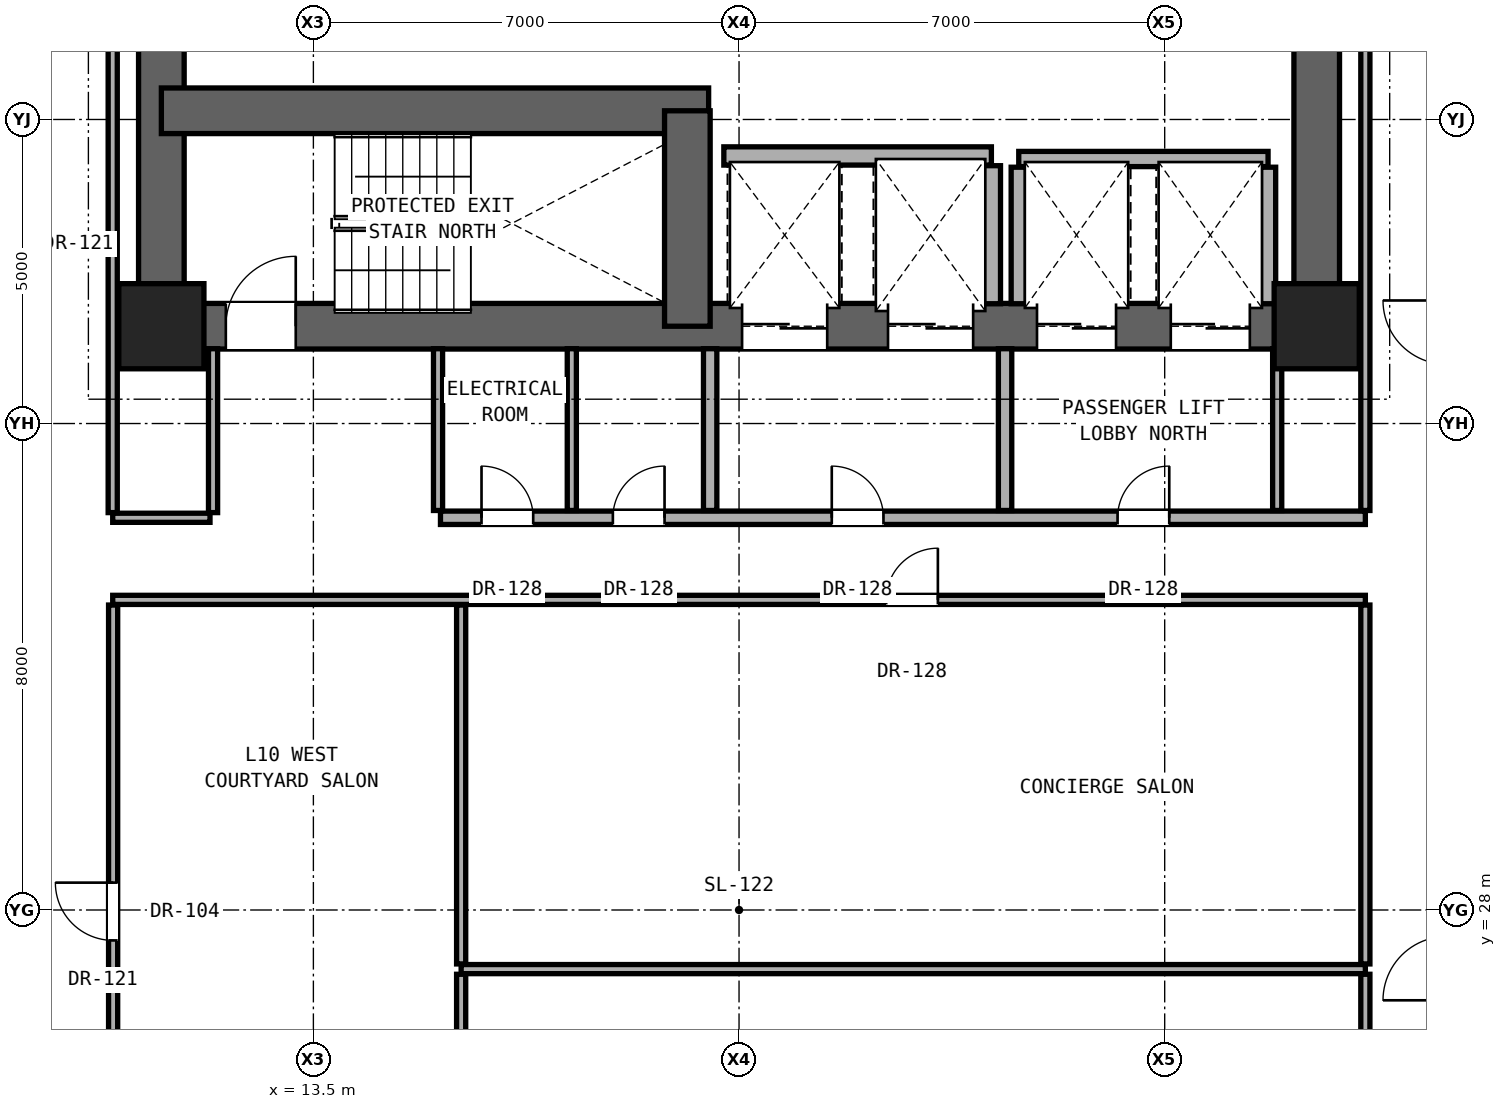
"""IFC4 building model, lengths in metres.
Left out: names, types, materials, properties, quantities, classifications, styles, units other than length and angle.
Written with IfcOpenShell. Run it as: python <this file> out.ifc"""

import sys

from ifc_helpers import new_model, si_unit, direction, frame, frame_2d, origin, origin_2d, place, context, subcontext, project, spatial, rectangle, extrude, element, fill, save


model = new_model("IFC4")
c1 = context("Model", 3, precision=1e-05, world=origin(), true_north=direction((0.0, 1.0)))
c2 = subcontext(c1, "Body", "Model", "MODEL_VIEW")
j1 = project(units=[si_unit("LENGTHUNIT", "METRE"), si_unit("PLANEANGLEUNIT", "RADIAN")], contexts=[c1])
p1 = place(None, origin())
s1 = spatial("IfcSite", under=j1, at=p1, CompositionType="ELEMENT")
p2 = place(p1, origin())
s2 = spatial("IfcBuilding", under=s1, at=p2, CompositionType="ELEMENT")
p3 = place(p2, frame((0.0, 0.0, 38.9)))
s3 = spatial("IfcBuildingStorey", under=s2, at=p3, CompositionType="ELEMENT", Elevation=38.9)
for number, where, z_axis, x_axis in (
    (1, (11.0, 37.6, 0.0), (0.0, 0.0, 1.0), (1.0, 0.0, 0.0)),
    (2, (30.0, 37.6, 0.0), (0.0, 0.0, 1.0), (1.0, 0.0, 0.0)),
):
    element("IfcColumn", number, at=place(p3, frame(where, z_axis=z_axis, x_axis=x_axis)), inside=s3, PredefinedType="COLUMN", context=c2, shape_type="SweptSolid", body=[
        extrude(rectangle(XDim=1.4, YDim=1.4, at=origin_2d()), origin(), (0.0, 0.0, 1.0), 3.3),
    ])
for number, where, z_axis, x_axis in (
    (3, (11.0, 37.6, 0.0), (0.0, 0.0, 1.0), (0.0, 1.0, 0.0)),
    (4, (30.0, 37.6, 0.0), (0.0, 0.0, 1.0), (0.0, 1.0, 0.0)),
):
    element("IfcWall", number, at=place(p3, frame(where, z_axis=z_axis, x_axis=x_axis)), inside=s3, PredefinedType="SHEAR", context=c2, shape_type="SweptSolid", body=[
        extrude(rectangle(XDim=6.0, YDim=0.75, at=frame_2d((3.0, 0.0))), origin(), (0.0, 0.0, 1.0), 3.06),
    ])
p4 = place(p3, frame((11.0, 37.6, 0.0), z_axis=(0.0, 0.0, 1.0), x_axis=(1.0, 0.0, 0.0)))
e5 = element("IfcWall", 5, at=p4, inside=s3, PredefinedType="SHEAR", context=c2, shape_type="SweptSolid", body=[
    extrude(rectangle(XDim=19.0, YDim=0.75, at=frame_2d((9.5, 0.0))), origin(), (0.0, 0.0, 1.0), 3.06),
])
p5 = place(p4, frame((1.06, 0.0, 0.0)))
e6 = element("IfcOpeningElement", 6, at=p5, cuts=e5, PredefinedType="OPENING", context=c2, shape_type="SweptSolid", body=[
    extrude(rectangle(XDim=1.15, YDim=2.2, at=frame_2d((0.575, 1.1))), frame((0.0, 0.385, 0.0), z_axis=(0.0, -1.0, 0.0), x_axis=(1.0, 0.0, 0.0)), (0.0, 0.0, 1.0), 0.77),
])
p6 = place(p4, frame((9.55, 0.0, 0.0)))
e7 = element("IfcOpeningElement", 7, at=p6, cuts=e5, PredefinedType="OPENING", context=c2, shape_type="SweptSolid", body=[
    extrude(rectangle(XDim=1.4, YDim=2.35, at=frame_2d((0.7, 1.175))), frame((0.0, 0.385, 0.0), z_axis=(0.0, -1.0, 0.0), x_axis=(1.0, 0.0, 0.0)), (0.0, 0.0, 1.0), 0.77),
])
p7 = place(p4, frame((11.95, 0.0, 0.0)))
e8 = element("IfcOpeningElement", 8, at=p7, cuts=e5, PredefinedType="OPENING", context=c2, shape_type="SweptSolid", body=[
    extrude(rectangle(XDim=1.4, YDim=2.35, at=frame_2d((0.7, 1.175))), frame((0.0, 0.385, 0.0), z_axis=(0.0, -1.0, 0.0), x_axis=(1.0, 0.0, 0.0)), (0.0, 0.0, 1.0), 0.77),
])
p8 = place(p4, frame((14.4, 0.0, 0.0)))
e9 = element("IfcOpeningElement", 9, at=p8, cuts=e5, PredefinedType="OPENING", context=c2, shape_type="SweptSolid", body=[
    extrude(rectangle(XDim=1.3, YDim=2.3, at=frame_2d((0.65, 1.15))), frame((0.0, 0.385, 0.0), z_axis=(0.0, -1.0, 0.0), x_axis=(1.0, 0.0, 0.0)), (0.0, 0.0, 1.0), 0.77),
])
p9 = place(p4, frame((16.6, 0.0, 0.0)))
e10 = element("IfcOpeningElement", 10, at=p9, cuts=e5, PredefinedType="OPENING", context=c2, shape_type="SweptSolid", body=[
    extrude(rectangle(XDim=1.3, YDim=2.3, at=frame_2d((0.65, 1.15))), frame((0.0, 0.385, 0.0), z_axis=(0.0, -1.0, 0.0), x_axis=(1.0, 0.0, 0.0)), (0.0, 0.0, 1.0), 0.77),
])
p10 = place(p3, frame((11.0, 41.143, 0.0), z_axis=(0.0, 0.0, 1.0), x_axis=(1.0, 0.0, 0.0)))
e11 = element("IfcWall", 11, at=p10, inside=s3, PredefinedType="SHEAR", context=c2, shape_type="SweptSolid", body=[
    extrude(rectangle(XDim=9.0, YDim=0.75, at=frame_2d((4.5, 0.0))), origin(), (0.0, 0.0, 1.0), 3.06),
])
p11 = place(p3, frame((19.65, 37.6, 0.0), z_axis=(0.0, 0.0, 1.0), x_axis=(0.0, 1.0, 0.0)))
e12 = element("IfcWall", 12, at=p11, inside=s3, PredefinedType="SHEAR", context=c2, shape_type="SweptSolid", body=[
    extrude(rectangle(XDim=3.543, YDim=0.75, at=frame_2d((1.771, 0.0))), origin(), (0.0, 0.0, 1.0), 3.06),
])
p12 = place(p3, frame((15.93, 27.028, 0.0), z_axis=(0.0, 0.0, 1.0), x_axis=(1.0, 0.0, 0.0)))
e13 = element("IfcWall", 13, at=p12, inside=s3, PredefinedType="PARTITIONING", context=c2, shape_type="SweptSolid", body=[
    extrude(rectangle(XDim=14.87, YDim=0.15, at=frame_2d((7.435, 0.0))), origin(), (0.0, 0.0, 1.0), 2.104),
])
p13 = place(p3, frame((10.2, 33.1, 0.0), z_axis=(0.0, 0.0, 1.0), x_axis=(1.0, 0.0, 0.0)))
e14 = element("IfcWall", 14, at=p13, inside=s3, PredefinedType="PARTITIONING", context=c2, shape_type="SweptSolid", body=[
    extrude(rectangle(XDim=20.6, YDim=0.15, at=frame_2d((10.3, 0.0))), origin(), (0.0, 0.0, 1.0), 2.104),
])
p14 = place(p13, frame((12.72, 0.0, 0.0)))
e15 = element("IfcOpeningElement", 15, at=p14, cuts=e14, PredefinedType="OPENING", context=c2, shape_type="SweptSolid", body=[
    extrude(rectangle(XDim=0.85, YDim=2.01, at=frame_2d((0.425, 1.005))), frame((0.0, 0.085, 0.0), z_axis=(0.0, -1.0, 0.0), x_axis=(1.0, 0.0, 0.0)), (0.0, 0.0, 1.0), 0.17),
])
p15 = place(p3, frame((10.2, 34.45, 0.0), z_axis=(0.0, 0.0, 1.0), x_axis=(1.0, 0.0, 0.0)))
e16 = element("IfcWall", 16, at=p15, inside=s3, PredefinedType="PARTITIONING", context=c2, shape_type="SweptSolid", body=[
    extrude(rectangle(XDim=1.6, YDim=0.15, at=frame_2d((0.8, 0.0))), origin(), (0.0, 0.0, 1.0), 2.104),
])
p16 = place(p3, frame((15.59, 34.45, 0.0), z_axis=(0.0, 0.0, 1.0), x_axis=(1.0, 0.0, 0.0)))
e17 = element("IfcWall", 17, at=p16, inside=s3, PredefinedType="SOLIDWALL", context=c2, shape_type="SweptSolid", body=[
    extrude(rectangle(XDim=15.21, YDim=0.22, at=frame_2d((7.605, 0.0))), origin(), (0.0, 0.0, 1.0), 2.104),
])
p17 = place(p16, frame((6.435, 0.0, 0.0)))
e18 = element("IfcOpeningElement", 18, at=p17, cuts=e17, PredefinedType="OPENING", context=c2, shape_type="SweptSolid", body=[
    extrude(rectangle(XDim=0.85, YDim=2.01, at=frame_2d((0.425, 1.005))), frame((0.0, 0.12, 0.0), z_axis=(0.0, -1.0, 0.0), x_axis=(1.0, 0.0, 0.0)), (0.0, 0.0, 1.0), 0.24),
])
p18 = place(p16, frame((11.135, 0.0, 0.0)))
e19 = element("IfcOpeningElement", 19, at=p18, cuts=e17, PredefinedType="OPENING", context=c2, shape_type="SweptSolid", body=[
    extrude(rectangle(XDim=0.85, YDim=2.01, at=frame_2d((0.425, 1.005))), frame((0.0, 0.12, 0.0), z_axis=(0.0, -1.0, 0.0), x_axis=(1.0, 0.0, 0.0)), (0.0, 0.0, 1.0), 0.24),
])
p19 = place(p16, frame((0.675, 0.0, 0.0)))
e20 = element("IfcOpeningElement", 20, at=p19, cuts=e17, PredefinedType="OPENING", context=c2, shape_type="SweptSolid", body=[
    extrude(rectangle(XDim=0.85, YDim=2.01, at=frame_2d((0.425, 1.005))), frame((0.0, 0.12, 0.0), z_axis=(0.0, -1.0, 0.0), x_axis=(1.0, 0.0, 0.0)), (0.0, 0.0, 1.0), 0.24),
])
p20 = place(p16, frame((2.835, 0.0, 0.0)))
e21 = element("IfcOpeningElement", 21, at=p20, cuts=e17, PredefinedType="OPENING", context=c2, shape_type="SweptSolid", body=[
    extrude(rectangle(XDim=0.85, YDim=2.01, at=frame_2d((0.425, 1.005))), frame((0.0, 0.12, 0.0), z_axis=(0.0, -1.0, 0.0), x_axis=(1.0, 0.0, 0.0)), (0.0, 0.0, 1.0), 0.24),
])
p21 = place(p3, frame((25.1, 40.35, 0.0), z_axis=(0.0, 0.0, 1.0), x_axis=(1.0, 0.0, 0.0)))
e22 = element("IfcWall", 22, at=p21, inside=s3, PredefinedType="SOLIDWALL", context=c2, shape_type="SweptSolid", body=[
    extrude(rectangle(XDim=4.1, YDim=0.25, at=frame_2d((2.05, 0.0))), origin(), (0.0, 0.0, 1.0), 3.06),
])
p22 = place(p3, frame((20.25, 40.4, 0.0), z_axis=(0.0, 0.0, 1.0), x_axis=(1.0, 0.0, 0.0)))
e23 = element("IfcWall", 23, at=p22, inside=s3, PredefinedType="SOLIDWALL", context=c2, shape_type="SweptSolid", body=[
    extrude(rectangle(XDim=4.4, YDim=0.3, at=frame_2d((2.2, 0.0))), origin(), (0.0, 0.0, 1.0), 3.06),
])
p23 = place(p3, frame((10.207, 22.935, 0.0), z_axis=(0.0, 0.0, 1.0), x_axis=(0.0, 1.0, 0.0)))
e24 = element("IfcWall", 24, at=p23, inside=s3, PredefinedType="PARTITIONING", context=c2, shape_type="SweptSolid", body=[
    extrude(rectangle(XDim=10.08, YDim=0.15, at=frame_2d((5.04, 0.0))), origin(), (0.0, 0.0, 1.0), 2.279),
])
p24 = place(p23, frame((4.565, 0.0, 0.0)))
e25 = element("IfcOpeningElement", 25, at=p24, cuts=e24, PredefinedType="OPENING", context=c2, shape_type="SweptSolid", body=[
    extrude(rectangle(XDim=0.95, YDim=2.15, at=frame_2d((0.475, 1.075))), frame((0.0, 0.085, 0.0), z_axis=(0.0, -1.0, 0.0), x_axis=(1.0, 0.0, 0.0)), (0.0, 0.0, 1.0), 0.17),
])
p25 = place(p3, frame((10.2, 34.535, 0.0), z_axis=(0.0, 0.0, 1.0), x_axis=(0.0, 1.0, 0.0)))
e26 = element("IfcWall", 26, at=p25, inside=s3, PredefinedType="PARTITIONING", context=c2, shape_type="SweptSolid", body=[
    extrude(rectangle(XDim=9.13, YDim=0.15, at=frame_2d((4.565, 0.0))), origin(), (0.0, 0.0, 1.0), 2.436),
])
p26 = place(p3, frame((11.85, 34.535, 0.0), z_axis=(0.0, 0.0, 1.0), x_axis=(0.0, 1.0, 0.0)))
e27 = element("IfcWall", 27, at=p26, inside=s3, PredefinedType="PARTITIONING", context=c2, shape_type="SweptSolid", body=[
    extrude(rectangle(XDim=2.695, YDim=0.15, at=frame_2d((1.348, 0.0))), origin(), (0.0, 0.0, 1.0), 3.06),
])
p27 = place(p3, frame((15.55, 34.57, 0.0), z_axis=(0.0, 0.0, 1.0), x_axis=(0.0, 1.0, 0.0)))
e28 = element("IfcWall", 28, at=p27, inside=s3, PredefinedType="PARTITIONING", context=c2, shape_type="SweptSolid", body=[
    extrude(rectangle(XDim=2.66, YDim=0.15, at=frame_2d((1.33, 0.0))), origin(), (0.0, 0.0, 1.0), 2.589),
])
p28 = place(p3, frame((15.93, 22.935, 0.0), z_axis=(0.0, 0.0, 1.0), x_axis=(0.0, 1.0, 0.0)))
e29 = element("IfcWall", 29, at=p28, inside=s3, PredefinedType="PARTITIONING", context=c2, shape_type="SweptSolid", body=[
    extrude(rectangle(XDim=4.008, YDim=0.15, at=frame_2d((2.004, 0.0))), origin(), (0.0, 0.0, 1.0), 2.104),
])
p29 = place(p3, frame((15.93, 27.113, 0.0), z_axis=(0.0, 0.0, 1.0), x_axis=(0.0, 1.0, 0.0)))
e30 = element("IfcWall", 30, at=p29, inside=s3, PredefinedType="PARTITIONING", context=c2, shape_type="SweptSolid", body=[
    extrude(rectangle(XDim=5.902, YDim=0.15, at=frame_2d((2.951, 0.0))), origin(), (0.0, 0.0, 1.0), 2.104),
])
p30 = place(p3, frame((17.75, 34.57, 0.0), z_axis=(0.0, 0.0, 1.0), x_axis=(0.0, 1.0, 0.0)))
e31 = element("IfcWall", 31, at=p30, inside=s3, PredefinedType="PARTITIONING", context=c2, shape_type="SweptSolid", body=[
    extrude(rectangle(XDim=2.66, YDim=0.15, at=frame_2d((1.33, 0.0))), origin(), (0.0, 0.0, 1.0), 3.06),
])
p31 = place(p3, frame((20.025, 34.57, 0.0), z_axis=(0.0, 0.0, 1.0), x_axis=(0.0, 1.0, 0.0)))
e32 = element("IfcWall", 32, at=p31, inside=s3, PredefinedType="SOLIDWALL", context=c2, shape_type="SweptSolid", body=[
    extrude(rectangle(XDim=2.66, YDim=0.22, at=frame_2d((1.33, 0.0))), origin(), (0.0, 0.0, 1.0), 3.06),
])
p32 = place(p3, frame((24.65, 37.97, 0.0), z_axis=(0.0, 0.0, 1.0), x_axis=(0.0, 1.0, 0.0)))
e33 = element("IfcWall", 33, at=p32, inside=s3, PredefinedType="SOLIDWALL", context=c2, shape_type="SweptSolid", body=[
    extrude(rectangle(XDim=2.27, YDim=0.3, at=frame_2d((1.135, 0.0))), origin(), (0.0, 0.0, 1.0), 3.06),
])
p33 = place(p3, frame((24.875, 34.57, 0.0), z_axis=(0.0, 0.0, 1.0), x_axis=(0.0, 1.0, 0.0)))
e34 = element("IfcWall", 34, at=p33, inside=s3, PredefinedType="SOLIDWALL", context=c2, shape_type="SweptSolid", body=[
    extrude(rectangle(XDim=2.66, YDim=0.22, at=frame_2d((1.33, 0.0))), origin(), (0.0, 0.0, 1.0), 3.06),
])
p34 = place(p3, frame((25.1, 37.97, 0.0), z_axis=(0.0, 0.0, 1.0), x_axis=(0.0, 1.0, 0.0)))
e35 = element("IfcWall", 35, at=p34, inside=s3, PredefinedType="SOLIDWALL", context=c2, shape_type="SweptSolid", body=[
    extrude(rectangle(XDim=2.245, YDim=0.25, at=frame_2d((1.123, 0.0))), origin(), (0.0, 0.0, 1.0), 3.06),
])
p35 = place(p3, frame((29.35, 34.57, 0.0), z_axis=(0.0, 0.0, 1.0), x_axis=(0.0, 1.0, 0.0)))
e36 = element("IfcWall", 36, at=p35, inside=s3, PredefinedType="PARTITIONING", context=c2, shape_type="SweptSolid", body=[
    extrude(rectangle(XDim=2.66, YDim=0.15, at=frame_2d((1.33, 0.0))), origin(), (0.0, 0.0, 1.0), 3.06),
])
p36 = place(p3, frame((29.2, 37.97, 0.0), z_axis=(0.0, 0.0, 1.0), x_axis=(0.0, 1.0, 0.0)))
e37 = element("IfcWall", 37, at=p36, inside=s3, PredefinedType="SOLIDWALL", context=c2, shape_type="SweptSolid", body=[
    extrude(rectangle(XDim=2.245, YDim=0.25, at=frame_2d((1.123, 0.0))), origin(), (0.0, 0.0, 1.0), 3.06),
])
p37 = place(p3, frame((30.8, 19.985, 0.0), z_axis=(0.0, 0.0, 1.0), x_axis=(0.0, 1.0, 0.0)))
e38 = element("IfcWall", 38, at=p37, inside=s3, PredefinedType="PARTITIONING", context=c2, shape_type="SweptSolid", body=[
    extrude(rectangle(XDim=6.958, YDim=0.15, at=frame_2d((3.479, 0.0))), origin(), (0.0, 0.0, 1.0), 2.279),
])
p38 = place(p3, frame((30.8, 27.113, 0.0), z_axis=(0.0, 0.0, 1.0), x_axis=(0.0, 1.0, 0.0)))
e39 = element("IfcWall", 39, at=p38, inside=s3, PredefinedType="PARTITIONING", context=c2, shape_type="SweptSolid", body=[
    extrude(rectangle(XDim=5.902, YDim=0.15, at=frame_2d((2.951, 0.0))), origin(), (0.0, 0.0, 1.0), 2.279),
])
p39 = place(p3, frame((30.8, 34.57, 0.0), z_axis=(0.0, 0.0, 1.0), x_axis=(0.0, 1.0, 0.0)))
e40 = element("IfcWall", 40, at=p39, inside=s3, PredefinedType="PARTITIONING", context=c2, shape_type="SweptSolid", body=[
    extrude(rectangle(XDim=9.095, YDim=0.15, at=frame_2d((4.547, 0.0))), origin(), (0.0, 0.0, 1.0), 2.436),
])
p40 = place(p5, origin())
e41 = element("IfcDoor", 41, at=p40, inside=s3, OperationType="SINGLE_SWING_RIGHT", PredefinedType="DOOR", context=c2, shape_type="SweptSolid", body=[
    extrude(rectangle(XDim=1.15, YDim=2.2, at=frame_2d((0.575, 1.1))), frame((0.0, 0.025, 0.0), z_axis=(0.0, -1.0, 0.0), x_axis=(1.0, 0.0, 0.0)), (0.0, 0.0, 1.0), 0.05),
])
fill(e6, e41)
p41 = place(p17, origin())
e42 = element("IfcDoor", 42, at=p41, inside=s3, OperationType="SINGLE_SWING_LEFT", PredefinedType="DOOR", context=c2, shape_type="SweptSolid", body=[
    extrude(rectangle(XDim=0.85, YDim=2.01, at=frame_2d((0.425, 1.005))), frame((0.0, 0.025, 0.0), z_axis=(0.0, -1.0, 0.0), x_axis=(1.0, 0.0, 0.0)), (0.0, 0.0, 1.0), 0.05),
])
fill(e18, e42)
p42 = place(p18, origin())
e43 = element("IfcDoor", 43, at=p42, inside=s3, OperationType="SINGLE_SWING_RIGHT", PredefinedType="DOOR", context=c2, shape_type="SweptSolid", body=[
    extrude(rectangle(XDim=0.85, YDim=2.01, at=frame_2d((0.425, 1.005))), frame((0.0, 0.025, 0.0), z_axis=(0.0, -1.0, 0.0), x_axis=(1.0, 0.0, 0.0)), (0.0, 0.0, 1.0), 0.05),
])
fill(e19, e43)
p43 = place(p19, origin())
e44 = element("IfcDoor", 44, at=p43, inside=s3, OperationType="SINGLE_SWING_LEFT", PredefinedType="DOOR", context=c2, shape_type="SweptSolid", body=[
    extrude(rectangle(XDim=0.85, YDim=2.01, at=frame_2d((0.425, 1.005))), frame((0.0, 0.025, 0.0), z_axis=(0.0, -1.0, 0.0), x_axis=(1.0, 0.0, 0.0)), (0.0, 0.0, 1.0), 0.05),
])
fill(e20, e44)
p44 = place(p20, origin())
e45 = element("IfcDoor", 45, at=p44, inside=s3, OperationType="SINGLE_SWING_RIGHT", PredefinedType="DOOR", context=c2, shape_type="SweptSolid", body=[
    extrude(rectangle(XDim=0.85, YDim=2.01, at=frame_2d((0.425, 1.005))), frame((0.0, 0.025, 0.0), z_axis=(0.0, -1.0, 0.0), x_axis=(1.0, 0.0, 0.0)), (0.0, 0.0, 1.0), 0.05),
])
fill(e21, e45)
p45 = place(p24, origin())
e46 = element("IfcDoor", 46, at=p45, inside=s3, OperationType="SINGLE_SWING_RIGHT", PredefinedType="DOOR", context=c2, shape_type="SweptSolid", body=[
    extrude(rectangle(XDim=0.95, YDim=2.15, at=frame_2d((0.475, 1.075))), frame((0.0, 0.025, 0.0), z_axis=(0.0, -1.0, 0.0), x_axis=(1.0, 0.0, 0.0)), (0.0, 0.0, 1.0), 0.05),
])
fill(e25, e46)
p46 = place(p14, origin())
e47 = element("IfcDoor", 47, at=p46, inside=s3, OperationType="SINGLE_SWING_RIGHT", PredefinedType="DOOR", context=c2, shape_type="SweptSolid", body=[
    extrude(rectangle(XDim=0.85, YDim=2.01, at=frame_2d((0.425, 1.005))), frame((0.0, 0.025, 0.0), z_axis=(0.0, -1.0, 0.0), x_axis=(1.0, 0.0, 0.0)), (0.0, 0.0, 1.0), 0.05),
])
fill(e15, e47)
p47 = place(p6, origin())
e48 = element("IfcDoor", 48, at=p47, inside=s3, OperationType="DOUBLE_DOOR_SLIDING", PredefinedType="DOOR", context=c2, shape_type="SweptSolid", body=[
    extrude(rectangle(XDim=1.4, YDim=2.35, at=frame_2d((0.7, 1.175))), frame((0.0, 0.025, 0.0), z_axis=(0.0, -1.0, 0.0), x_axis=(1.0, 0.0, 0.0)), (0.0, 0.0, 1.0), 0.05),
])
fill(e7, e48)
p48 = place(p7, origin())
e49 = element("IfcDoor", 49, at=p48, inside=s3, OperationType="DOUBLE_DOOR_SLIDING", PredefinedType="DOOR", context=c2, shape_type="SweptSolid", body=[
    extrude(rectangle(XDim=1.4, YDim=2.35, at=frame_2d((0.7, 1.175))), frame((0.0, 0.025, 0.0), z_axis=(0.0, -1.0, 0.0), x_axis=(1.0, 0.0, 0.0)), (0.0, 0.0, 1.0), 0.05),
])
fill(e8, e49)
p49 = place(p8, origin())
e50 = element("IfcDoor", 50, at=p49, inside=s3, OperationType="DOUBLE_DOOR_SLIDING", PredefinedType="DOOR", context=c2, shape_type="SweptSolid", body=[
    extrude(rectangle(XDim=1.3, YDim=2.3, at=frame_2d((0.65, 1.15))), frame((0.0, 0.025, 0.0), z_axis=(0.0, -1.0, 0.0), x_axis=(1.0, 0.0, 0.0)), (0.0, 0.0, 1.0), 0.05),
])
fill(e9, e50)
p50 = place(p9, origin())
e51 = element("IfcDoor", 51, at=p50, inside=s3, OperationType="DOUBLE_DOOR_SLIDING", PredefinedType="DOOR", context=c2, shape_type="SweptSolid", body=[
    extrude(rectangle(XDim=1.3, YDim=2.3, at=frame_2d((0.65, 1.15))), frame((0.0, 0.025, 0.0), z_axis=(0.0, -1.0, 0.0), x_axis=(1.0, 0.0, 0.0)), (0.0, 0.0, 1.0), 0.05),
])
fill(e10, e51)
save(model, sys.argv[1])
